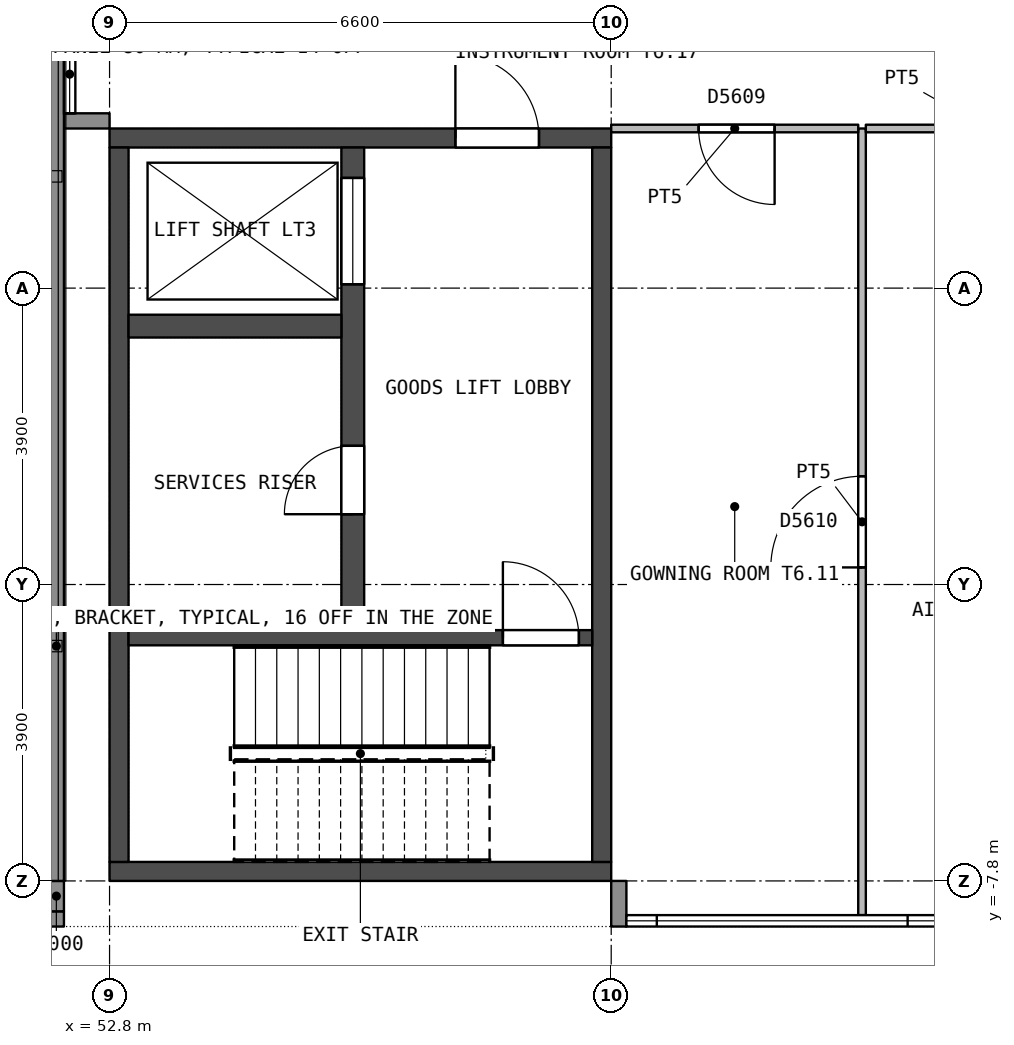
"""IFC4 building model, lengths in metres.
Left out: names, types, materials, properties, quantities, classifications, styles, units other than length and angle.
Written with IfcOpenShell. Run it as: python <this file> out.ifc"""

import sys

from ifc_helpers import new_model, si_unit, direction, frame, frame_2d, origin, place, context, subcontext, project, spatial, rectangle, extrude, element, fill, save


model = new_model("IFC4")
c1 = context("Model", 3, precision=1e-05, world=origin(), true_north=direction((0.0, 1.0)))
c2 = subcontext(c1, "Body", "Model", "MODEL_VIEW")
j1 = project(units=[si_unit("LENGTHUNIT", "METRE"), si_unit("PLANEANGLEUNIT", "RADIAN")], contexts=[c1])
p1 = place(None, origin())
s1 = spatial("IfcSite", under=j1, at=p1, CompositionType="ELEMENT")
p2 = place(p1, origin())
s2 = spatial("IfcBuilding", under=s1, at=p2, CompositionType="ELEMENT")
p3 = place(p2, frame((0.0, 0.0, 27.9)))
s3 = spatial("IfcBuildingStorey", under=s2, at=p3, CompositionType="ELEMENT", Elevation=27.9)
p4 = place(p3, frame((59.4, 1.975, 0.0), z_axis=(0.0, 0.0, 1.0), x_axis=(-1.0, 0.0, 0.0)))
e1 = element("IfcWall", 1, at=p4, inside=s3, PredefinedType="SHEAR", context=c2, shape_type="SweptSolid", body=[
    extrude(rectangle(XDim=6.6, YDim=0.25, at=frame_2d((3.3, 0.0))), origin(), (0.0, 0.0, 1.0), 4.2),
])
p5 = place(p4, frame((0.95, 0.0, 0.0)))
e2 = element("IfcOpeningElement", 2, at=p5, cuts=e1, PredefinedType="OPENING", context=c2, shape_type="SweptSolid", body=[
    extrude(rectangle(XDim=1.1, YDim=2.1, at=frame_2d((0.55, 1.05))), frame((0.0, 0.135, 0.0), z_axis=(0.0, -1.0, 0.0), x_axis=(1.0, 0.0, 0.0)), (0.0, 0.0, 1.0), 0.27),
])
p6 = place(p3, frame((59.4, -7.675, 0.0), z_axis=(0.0, 0.0, 1.0), x_axis=(-1.0, 0.0, 0.0)))
e3 = element("IfcWall", 3, at=p6, inside=s3, PredefinedType="SHEAR", context=c2, shape_type="SweptSolid", body=[
    extrude(rectangle(XDim=6.6, YDim=0.25, at=frame_2d((3.3, 0.0))), origin(), (0.0, 0.0, 1.0), 4.2),
])
for number, where, z_axis, x_axis in (
    (4, (59.275, 1.85, 0.0), (0.0, 0.0, 1.0), (0.0, -1.0, 0.0)),
    (5, (52.925, 1.85, 0.0), (0.0, 0.0, 1.0), (0.0, -1.0, 0.0)),
):
    element("IfcWall", number, at=place(p3, frame(where, z_axis=z_axis, x_axis=x_axis)), inside=s3, PredefinedType="SHEAR", context=c2, shape_type="SweptSolid", body=[
        extrude(rectangle(XDim=9.4, YDim=0.25, at=frame_2d((4.7, 0.0))), origin(), (0.0, 0.0, 1.0), 4.2),
    ])
p7 = place(p3, frame((59.15, -4.6, 0.0), z_axis=(0.0, 0.0, 1.0), x_axis=(-1.0, 0.0, 0.0)))
e6 = element("IfcWall", 6, at=p7, inside=s3, PredefinedType="SHEAR", context=c2, shape_type="SweptSolid", body=[
    extrude(rectangle(XDim=6.1, YDim=0.2, at=frame_2d((3.05, 0.0))), origin(), (0.0, 0.0, 1.0), 4.2),
])
p8 = place(p7, frame((0.175, 0.0, 0.0)))
e7 = element("IfcOpeningElement", 7, at=p8, cuts=e6, PredefinedType="OPENING", context=c2, shape_type="SweptSolid", body=[
    extrude(rectangle(XDim=1.0, YDim=2.1, at=frame_2d((0.5, 1.05))), frame((0.0, 0.11, 0.0), z_axis=(0.0, -1.0, 0.0), x_axis=(1.0, 0.0, 0.0)), (0.0, 0.0, 1.0), 0.22),
])
p9 = place(p3, frame((56.0, 1.85, 0.0), z_axis=(0.0, 0.0, 1.0), x_axis=(0.0, -1.0, 0.0)))
e8 = element("IfcWall", 8, at=p9, inside=s3, PredefinedType="SHEAR", context=c2, shape_type="SweptSolid", body=[
    extrude(rectangle(XDim=6.35, YDim=0.3, at=frame_2d((3.175, 0.0))), origin(), (0.0, 0.0, 1.0), 4.2),
])
p10 = place(p9, frame((3.925, 0.0, 0.0)))
e9 = element("IfcOpeningElement", 9, at=p10, cuts=e8, PredefinedType="OPENING", context=c2, shape_type="SweptSolid", body=[
    extrude(rectangle(XDim=0.9, YDim=2.1, at=frame_2d((0.45, 1.05))), frame((0.0, 0.16, 0.0), z_axis=(0.0, -1.0, 0.0), x_axis=(1.0, 0.0, 0.0)), (0.0, 0.0, 1.0), 0.32),
])
p11 = place(p9, frame((0.4, 0.0, 0.0)))
e10 = element("IfcOpeningElement", 10, at=p11, cuts=e8, PredefinedType="OPENING", context=c2, shape_type="SweptSolid", body=[
    extrude(rectangle(XDim=1.4, YDim=2.4, at=frame_2d((0.7, 1.2))), frame((0.0, 0.16, 0.0), z_axis=(0.0, -1.0, 0.0), x_axis=(1.0, 0.0, 0.0)), (0.0, 0.0, 1.0), 0.32),
])
p12 = place(p3, frame((55.85, -0.5, 0.0), z_axis=(0.0, 0.0, 1.0), x_axis=(-1.0, 0.0, 0.0)))
e11 = element("IfcWall", 11, at=p12, inside=s3, PredefinedType="SHEAR", context=c2, shape_type="SweptSolid", body=[
    extrude(rectangle(XDim=2.8, YDim=0.3, at=frame_2d((1.4, 0.0))), origin(), (0.0, 0.0, 1.0), 4.2),
])
p13 = place(p3, frame((59.5, -7.8, 0.0), z_axis=(0.0, 0.0, 1.0), x_axis=(0.0, -1.0, 0.0)))
e12 = element("IfcWall", 12, at=p13, inside=s3, PredefinedType="STANDARD", context=c2, shape_type="SweptSolid", body=[
    extrude(rectangle(XDim=0.6, YDim=0.2, at=frame_2d((0.3, 0.0))), origin(), (0.0, 0.0, 1.0), 3.55),
])
p14 = place(p3, frame((52.8, 2.2, 0.0), z_axis=(0.0, 0.0, 1.0), x_axis=(-1.0, 0.0, 0.0)))
e13 = element("IfcWall", 13, at=p14, inside=s3, PredefinedType="STANDARD", context=c2, shape_type="SweptSolid", body=[
    extrude(rectangle(XDim=0.6, YDim=0.2, at=frame_2d((0.3, 0.0))), origin(), (0.0, 0.0, 1.0), 3.55),
])
p15 = place(p3, frame((-0.6, -8.3, 0.0), z_axis=(0.0, 0.0, 1.0), x_axis=(1.0, 0.0, 0.0)))
e14 = element("IfcWall", 14, at=p15, inside=s3, PredefinedType="PARAPET", context=c2, shape_type="SweptSolid", body=[
    extrude(rectangle(XDim=52.8, YDim=0.2, at=frame_2d((26.4, 0.0))), origin(), (0.0, 0.0, 1.0), 1.1),
])
p16 = place(p3, frame((52.1, -8.2, 0.0), z_axis=(0.0, 0.0, 1.0), x_axis=(0.0, 1.0, 0.0)))
e15 = element("IfcWall", 15, at=p16, inside=s3, PredefinedType="PARAPET", context=c2, shape_type="SweptSolid", body=[
    extrude(rectangle(XDim=0.4, YDim=0.2, at=frame_2d((0.2, 0.0))), origin(), (0.0, 0.0, 1.0), 1.1),
])
p17 = place(p3, frame((52.1, -7.8, 0.0), z_axis=(0.0, 0.0, 1.0), x_axis=(0.0, 1.0, 0.0)))
e16 = element("IfcWall", 16, at=p17, inside=s3, PredefinedType="PARAPET", context=c2, shape_type="SweptSolid", body=[
    extrude(rectangle(XDim=30.9, YDim=0.2, at=frame_2d((15.45, 0.0))), origin(), (0.0, 0.0, 1.0), 1.1),
])
p18 = place(p3, frame((62.7, 2.1, 0.0), z_axis=(0.0, 0.0, 1.0), x_axis=(0.0, -1.0, 0.0)))
e17 = element("IfcWall", 17, at=p18, inside=s3, PredefinedType="PARTITIONING", context=c2, shape_type="SweptSolid", body=[
    extrude(rectangle(XDim=10.35, YDim=0.1, at=frame_2d((5.175, 0.0))), origin(), (0.0, 0.0, 1.0), 4.2),
])
p19 = place(p18, frame((4.575, 0.0, 0.0)))
e18 = element("IfcOpeningElement", 18, at=p19, cuts=e17, PredefinedType="OPENING", context=c2, shape_type="SweptSolid", body=[
    extrude(rectangle(XDim=1.2, YDim=2.1, at=frame_2d((0.6, 1.05))), frame((0.0, 0.06, 0.0), z_axis=(0.0, -1.0, 0.0), x_axis=(1.0, 0.0, 0.0)), (0.0, 0.0, 1.0), 0.12),
])
p20 = place(p3, frame((62.65, 2.1, 0.0), z_axis=(0.0, 0.0, 1.0), x_axis=(-1.0, 0.0, 0.0)))
e19 = element("IfcWall", 19, at=p20, inside=s3, PredefinedType="PARTITIONING", context=c2, shape_type="SweptSolid", body=[
    extrude(rectangle(XDim=3.25, YDim=0.1, at=frame_2d((1.625, 0.0))), origin(), (0.0, 0.0, 1.0), 4.2),
])
p21 = place(p20, frame((1.1, 0.0, 0.0)))
e20 = element("IfcOpeningElement", 20, at=p21, cuts=e19, PredefinedType="OPENING", context=c2, shape_type="SweptSolid", body=[
    extrude(rectangle(XDim=1.0, YDim=2.1, at=frame_2d((0.5, 1.05))), frame((0.0, 0.06, 0.0), z_axis=(0.0, -1.0, 0.0), x_axis=(1.0, 0.0, 0.0)), (0.0, 0.0, 1.0), 0.12),
])
p22 = place(p3, frame((65.95, 2.1, 0.0), z_axis=(0.0, 0.0, 1.0), x_axis=(-1.0, 0.0, 0.0)))
e21 = element("IfcWall", 21, at=p22, inside=s3, PredefinedType="PARTITIONING", context=c2, shape_type="SweptSolid", body=[
    extrude(rectangle(XDim=3.2, YDim=0.1, at=frame_2d((1.6, 0.0))), origin(), (0.0, 0.0, 1.0), 4.2),
])
p23 = place(p22, frame((1.0, 0.0, 0.0)))
e22 = element("IfcOpeningElement", 22, at=p23, cuts=e21, PredefinedType="OPENING", context=c2, shape_type="SweptSolid", body=[
    extrude(rectangle(XDim=1.2, YDim=2.1, at=frame_2d((0.6, 1.05))), frame((0.0, 0.06, 0.0), z_axis=(0.0, -1.0, 0.0), x_axis=(1.0, 0.0, 0.0)), (0.0, 0.0, 1.0), 0.12),
])
p24 = place(p10, origin())
e23 = element("IfcDoor", 23, at=p24, inside=s3, OperationType="SINGLE_SWING_RIGHT", PredefinedType="DOOR", context=c2, shape_type="SweptSolid", body=[
    extrude(rectangle(XDim=0.9, YDim=2.1, at=frame_2d((0.45, 1.05))), frame((0.0, 0.025, 0.0), z_axis=(0.0, -1.0, 0.0), x_axis=(1.0, 0.0, 0.0)), (0.0, 0.0, 1.0), 0.05),
])
fill(e9, e23)
p25 = place(p5, origin())
e24 = element("IfcDoor", 24, at=p25, inside=s3, OperationType="SINGLE_SWING_RIGHT", PredefinedType="DOOR", context=c2, shape_type="SweptSolid", body=[
    extrude(rectangle(XDim=1.1, YDim=2.1, at=frame_2d((0.55, 1.05))), frame((0.0, 0.025, 0.0), z_axis=(0.0, -1.0, 0.0), x_axis=(1.0, 0.0, 0.0)), (0.0, 0.0, 1.0), 0.05),
])
fill(e2, e24)
p26 = place(p8, origin())
e25 = element("IfcDoor", 25, at=p26, inside=s3, OperationType="SINGLE_SWING_RIGHT", PredefinedType="DOOR", context=c2, shape_type="SweptSolid", body=[
    extrude(rectangle(XDim=1.0, YDim=2.1, at=frame_2d((0.5, 1.05))), frame((0.0, 0.025, 0.0), z_axis=(0.0, -1.0, 0.0), x_axis=(1.0, 0.0, 0.0)), (0.0, 0.0, 1.0), 0.05),
])
fill(e7, e25)
p27 = place(p11, origin())
e26 = element("IfcDoor", 26, at=p27, inside=s3, OperationType="DOUBLE_DOOR_SLIDING", PredefinedType="NOTDEFINED", context=c2, shape_type="SweptSolid", body=[
    extrude(rectangle(XDim=1.4, YDim=2.4, at=frame_2d((0.7, 1.2))), frame((0.0, 0.025, 0.0), z_axis=(0.0, -1.0, 0.0), x_axis=(1.0, 0.0, 0.0)), (0.0, 0.0, 1.0), 0.05),
])
fill(e10, e26)
p28 = place(p21, origin())
e27 = element("IfcDoor", 27, at=p28, inside=s3, OperationType="SINGLE_SWING_LEFT", PredefinedType="DOOR", context=c2, shape_type="SweptSolid", body=[
    extrude(rectangle(XDim=1.0, YDim=2.1, at=frame_2d((0.5, 1.05))), frame((0.0, 0.027, 0.0), z_axis=(0.0, -1.0, 0.0), x_axis=(1.0, 0.0, 0.0)), (0.0, 0.0, 1.0), 0.054),
])
fill(e20, e27)
p29 = place(p19, origin())
e28 = element("IfcDoor", 28, at=p29, inside=s3, OperationType="SINGLE_SWING_RIGHT", PredefinedType="DOOR", context=c2, shape_type="SweptSolid", body=[
    extrude(rectangle(XDim=1.2, YDim=2.1, at=frame_2d((0.6, 1.05))), frame((0.0, 0.027, 0.0), z_axis=(0.0, -1.0, 0.0), x_axis=(1.0, 0.0, 0.0)), (0.0, 0.0, 1.0), 0.054),
])
fill(e18, e28)
save(model, sys.argv[1])
